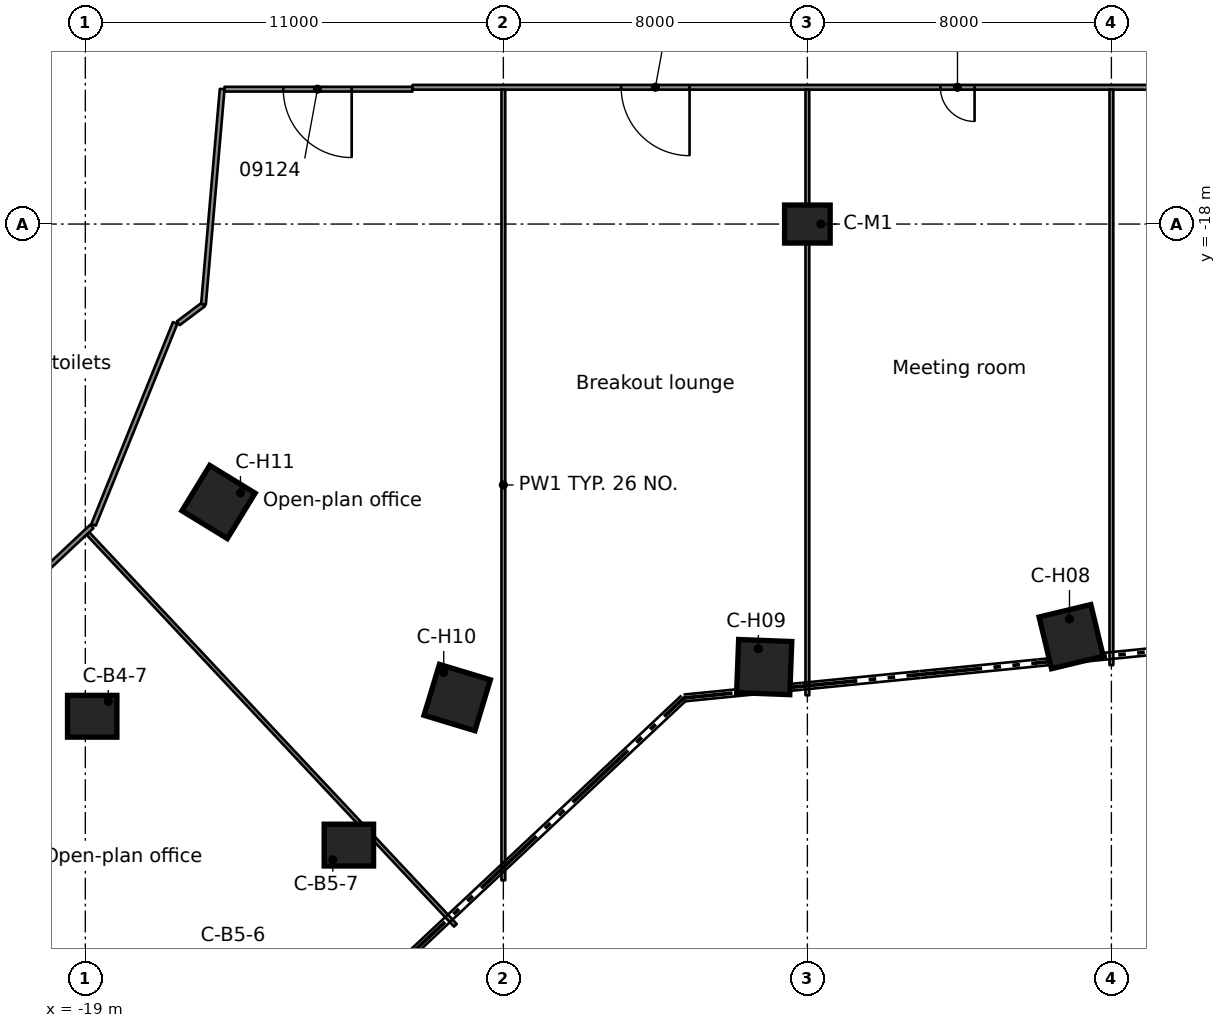
"""IFC4 building model, lengths in metres.
Left out: names, types, materials, properties, quantities, classifications, styles, units other than length and angle.
Written with IfcOpenShell. Run it as: python <this file> out.ifc"""

import sys

from ifc_helpers import new_model, si_unit, direction, frame, frame_2d, origin, origin_2d, place, context, subcontext, project, spatial, rectangle, extrude, element, fill, save


model = new_model("IFC4")
c1 = context("Model", 3, precision=1e-05, world=origin(), true_north=direction((0.0, 1.0)))
c2 = subcontext(c1, "Body", "Model", "MODEL_VIEW")
j1 = project(units=[si_unit("LENGTHUNIT", "METRE"), si_unit("PLANEANGLEUNIT", "RADIAN")], contexts=[c1])
p1 = place(None, origin())
s1 = spatial("IfcSite", under=j1, at=p1, CompositionType="ELEMENT")
p2 = place(p1, origin())
s2 = spatial("IfcBuilding", under=s1, at=p2, CompositionType="ELEMENT")
p3 = place(p2, frame((0.0, 0.0, 40.8)))
s3 = spatial("IfcBuildingStorey", under=s2, at=p3, CompositionType="ELEMENT", Elevation=40.8)
for number, where, z_axis, x_axis in (
    (1, (-18.819, -30.951, 0.0), (0.0, 0.0, 1.0), (1.0, 0.0, 0.0)),
    (2, (-12.065, -34.341, 0.0), (0.0, 0.0, 1.0), (1.0, 0.0, 0.0)),
):
    element("IfcColumn", number, at=place(p3, frame(where, z_axis=z_axis, x_axis=x_axis)), inside=s3, PredefinedType="COLUMN", context=c2, shape_type="SweptSolid", body=[
        extrude(rectangle(XDim=1.3, YDim=1.1, at=origin_2d()), origin(), (0.0, 0.0, 1.0), 3.5),
    ])
for number, where, z_axis, x_axis in (
    (3, (6.942, -28.856, 0.0), (0.0, 0.0, 1.0), (0.234, -0.972, 0.0)),
    (4, (-1.136, -29.657, 0.0), (0.0, 0.0, 1.0), (-0.038, -0.999, 0.0)),
    (5, (-9.215, -30.459, 0.0), (0.0, 0.0, 1.0), (-0.29, -0.957, 0.0)),
    (6, (-15.495, -25.313, 0.0), (0.0, 0.0, 1.0), (-0.522, -0.853, 0.0)),
):
    element("IfcColumn", number, at=place(p3, frame(where, z_axis=z_axis, x_axis=x_axis)), inside=s3, PredefinedType="COLUMN", context=c2, shape_type="SweptSolid", body=[
        extrude(rectangle(XDim=1.4, YDim=1.4, at=origin_2d()), origin(), (0.0, 0.0, 1.0), 3.5),
    ])
p4 = place(p3, frame((0.0, -18.0, 0.0), z_axis=(0.0, 0.0, 1.0), x_axis=(1.0, 0.0, 0.0)))
e7 = element("IfcColumn", 7, at=p4, inside=s3, PredefinedType="COLUMN", context=c2, shape_type="SweptSolid", body=[
    extrude(rectangle(XDim=1.2, YDim=1.0, at=origin_2d()), origin(), (0.0, 0.0, 1.0), 3.5),
])
p5 = place(p3, frame((-26.451, -33.192, 0.0), z_axis=(0.0, 0.0, 1.0), x_axis=(0.684103113435, -0.729385309825, 0.0)))
e8 = element("IfcWall", 8, at=p5, inside=s3, PredefinedType="PARTITIONING", context=c2, shape_type="SweptSolid", body=[
    extrude(rectangle(XDim=14.137, YDim=0.1, at=frame_2d((7.068, 0.0))), origin(), (0.0, 0.0, 1.0), 3.06),
])
p6 = place(p3, frame((-18.934, -26.141, 0.0), z_axis=(0.0, 0.0, 1.0), x_axis=(0.684157665042, -0.729334141094, 0.0)))
e9 = element("IfcWall", 9, at=p6, inside=s3, PredefinedType="PARTITIONING", context=c2, shape_type="SweptSolid", body=[
    extrude(rectangle(XDim=14.137, YDim=0.1, at=frame_2d((7.069, 0.0))), origin(), (0.0, 0.0, 1.0), 3.06),
])
p7 = place(p3, frame((-16.553, -20.61, 0.0), z_axis=(0.0, 0.0, 1.0), x_axis=(0.799610497066, 0.600518986362, 0.0)))
e10 = element("IfcWall", 10, at=p7, inside=s3, PredefinedType="PARTITIONING", context=c2, shape_type="SweptSolid", body=[
    extrude(rectangle(XDim=0.828, YDim=0.125, at=frame_2d((0.414, 0.0))), origin(), (0.0, 0.0, 1.0), 3.06),
])
p8 = place(p3, frame((-10.391, -14.451, 0.0), z_axis=(0.0, 0.0, 1.0), x_axis=(-1.0, 0.0, 0.0)))
e11 = element("IfcWall", 11, at=p8, inside=s3, PredefinedType="PARTITIONING", context=c2, shape_type="SweptSolid", body=[
    extrude(rectangle(XDim=4.947, YDim=0.125, at=frame_2d((2.473, 0.0))), origin(), (0.0, 0.0, 1.0), 3.06),
])
p9 = place(p8, frame((1.6, 0.0, 0.0)))
e12 = element("IfcOpeningElement", 12, at=p9, cuts=e11, PredefinedType="OPENING", context=c2, shape_type="SweptSolid", body=[
    extrude(rectangle(XDim=1.8, YDim=2.1, at=frame_2d((0.9, 1.05))), frame((0.0, 0.073, 0.0), z_axis=(0.0, -1.0, 0.0), x_axis=(1.0, 0.0, 0.0)), (0.0, 0.0, 1.0), 0.145),
])
p10 = place(p3, frame((10.391, -14.401, 0.0), z_axis=(0.0, 0.0, 1.0), x_axis=(-1.0, 0.0, 0.0)))
e13 = element("IfcWall", 13, at=p10, inside=s3, PredefinedType="PARTITIONING", context=c2, shape_type="SweptSolid", body=[
    extrude(rectangle(XDim=20.781, YDim=0.125, at=frame_2d((10.391, 0.0))), origin(), (0.0, 0.0, 1.0), 3.06),
])
p11 = place(p10, frame((13.491, 0.0, 0.0)))
e14 = element("IfcOpeningElement", 14, at=p11, cuts=e13, PredefinedType="OPENING", context=c2, shape_type="SweptSolid", body=[
    extrude(rectangle(XDim=1.8, YDim=2.1, at=frame_2d((0.9, 1.05))), frame((0.0, 0.073, 0.0), z_axis=(0.0, -1.0, 0.0), x_axis=(1.0, 0.0, 0.0)), (0.0, 0.0, 1.0), 0.145),
])
p12 = place(p10, frame((5.991, 0.0, 0.0)))
e15 = element("IfcOpeningElement", 15, at=p12, cuts=e13, PredefinedType="OPENING", context=c2, shape_type="SweptSolid", body=[
    extrude(rectangle(XDim=0.9, YDim=2.1, at=frame_2d((0.45, 1.05))), frame((0.0, 0.073, 0.0), z_axis=(0.0, -1.0, 0.0), x_axis=(1.0, 0.0, 0.0)), (0.0, 0.0, 1.0), 0.145),
])
p13 = place(p3, frame((-18.829, -25.957, 0.0), z_axis=(0.0, 0.0, 1.0), x_axis=(-0.729377966172, -0.684110943096, 0.0)))
e16 = element("IfcWall", 16, at=p13, inside=s3, PredefinedType="PARTITIONING", context=c2, shape_type="SweptSolid", body=[
    extrude(rectangle(XDim=25.009, YDim=0.125, at=frame_2d((12.504, 0.0))), origin(), (0.0, 0.0, 1.0), 3.06),
])
p14 = place(p13, frame((4.552, 0.0, 0.0)))
e17 = element("IfcOpeningElement", 17, at=p14, cuts=e16, PredefinedType="OPENING", context=c2, shape_type="SweptSolid", body=[
    extrude(rectangle(XDim=1.8, YDim=2.1, at=frame_2d((0.9, 1.05))), frame((0.0, 0.073, 0.0), z_axis=(0.0, -1.0, 0.0), x_axis=(1.0, 0.0, 0.0)), (0.0, 0.0, 1.0), 0.145),
])
p15 = place(p13, frame((13.609, 0.0, 0.0)))
e18 = element("IfcOpeningElement", 18, at=p15, cuts=e16, PredefinedType="OPENING", context=c2, shape_type="SweptSolid", body=[
    extrude(rectangle(XDim=0.9, YDim=2.1, at=frame_2d((0.45, 1.05))), frame((0.0, 0.073, 0.0), z_axis=(0.0, -1.0, 0.0), x_axis=(1.0, 0.0, 0.0)), (0.0, 0.0, 1.0), 0.145),
])
p16 = place(p13, frame((20.859, 0.0, 0.0)))
e19 = element("IfcOpeningElement", 19, at=p16, cuts=e16, PredefinedType="OPENING", context=c2, shape_type="SweptSolid", body=[
    extrude(rectangle(XDim=0.9, YDim=2.1, at=frame_2d((0.45, 1.05))), frame((0.0, 0.073, 0.0), z_axis=(0.0, -1.0, 0.0), x_axis=(1.0, 0.0, 0.0)), (0.0, 0.0, 1.0), 0.145),
])
p17 = place(p3, frame((-18.784, -25.914, 0.0), z_axis=(0.0, 0.0, 1.0), x_axis=(0.374782940322, 0.927112586283, 0.0)))
e20 = element("IfcWall", 20, at=p17, inside=s3, PredefinedType="PARTITIONING", context=c2, shape_type="SweptSolid", body=[
    extrude(rectangle(XDim=5.729, YDim=0.125, at=frame_2d((2.864, 0.0))), origin(), (0.0, 0.0, 1.0), 3.06),
])
p18 = place(p3, frame((-15.891, -20.113, 0.0), z_axis=(0.0, 0.0, 1.0), x_axis=(0.086555508175, 0.996247029609, 0.0)))
e21 = element("IfcWall", 21, at=p18, inside=s3, PredefinedType="PARTITIONING", context=c2, shape_type="SweptSolid", body=[
    extrude(rectangle(XDim=5.686, YDim=0.125, at=frame_2d((2.843, 0.0))), origin(), (0.0, 0.0, 1.0), 3.06),
])
p19 = place(p3, frame((8.0, -29.605, 0.0), z_axis=(0.0, 0.0, 1.0), x_axis=(0.0, 1.0, 0.0)))
e22 = element("IfcWall", 22, at=p19, inside=s3, PredefinedType="PARTITIONING", context=c2, shape_type="SweptSolid", body=[
    extrude(rectangle(XDim=15.142, YDim=0.1, at=frame_2d((7.571, 0.0))), origin(), (0.0, 0.0, 1.0), 3.06),
])
p20 = place(p3, frame((0.0, -30.398, 0.0), z_axis=(0.0, 0.0, 1.0), x_axis=(0.0, 1.0, 0.0)))
e23 = element("IfcWall", 23, at=p20, inside=s3, PredefinedType="PARTITIONING", context=c2, shape_type="SweptSolid", body=[
    extrude(rectangle(XDim=15.935, YDim=0.1, at=frame_2d((7.968, 0.0))), origin(), (0.0, 0.0, 1.0), 3.06),
])
p21 = place(p3, frame((-8.0, -35.268, 0.0), z_axis=(0.0, 0.0, 1.0), x_axis=(0.0, 1.0, 0.0)))
e24 = element("IfcWall", 24, at=p21, inside=s3, PredefinedType="PARTITIONING", context=c2, shape_type="SweptSolid", body=[
    extrude(rectangle(XDim=20.805, YDim=0.1, at=frame_2d((10.403, 0.0))), origin(), (0.0, 0.0, 1.0), 3.06),
])
p22 = place(p9, origin())
e25 = element("IfcDoor", 25, at=p22, inside=s3, OperationType="DOUBLE_DOOR_SINGLE_SWING", PredefinedType="DOOR", context=c2, shape_type="SweptSolid", body=[
    extrude(rectangle(XDim=1.8, YDim=2.1, at=frame_2d((0.9, 1.05))), frame((0.0, 0.025, 0.0), z_axis=(0.0, -1.0, 0.0), x_axis=(1.0, 0.0, 0.0)), (0.0, 0.0, 1.0), 0.05),
])
fill(e12, e25)
p23 = place(p11, origin())
e26 = element("IfcDoor", 26, at=p23, inside=s3, OperationType="DOUBLE_DOOR_SINGLE_SWING", PredefinedType="DOOR", context=c2, shape_type="SweptSolid", body=[
    extrude(rectangle(XDim=1.8, YDim=2.1, at=frame_2d((0.9, 1.05))), frame((0.0, 0.025, 0.0), z_axis=(0.0, -1.0, 0.0), x_axis=(1.0, 0.0, 0.0)), (0.0, 0.0, 1.0), 0.05),
])
fill(e14, e26)
p24 = place(p12, origin())
e27 = element("IfcDoor", 27, at=p24, inside=s3, OperationType="SINGLE_SWING_LEFT", PredefinedType="DOOR", context=c2, shape_type="SweptSolid", body=[
    extrude(rectangle(XDim=0.9, YDim=2.1, at=frame_2d((0.45, 1.05))), frame((0.0, 0.025, 0.0), z_axis=(0.0, -1.0, 0.0), x_axis=(1.0, 0.0, 0.0)), (0.0, 0.0, 1.0), 0.05),
])
fill(e15, e27)
save(model, sys.argv[1])
